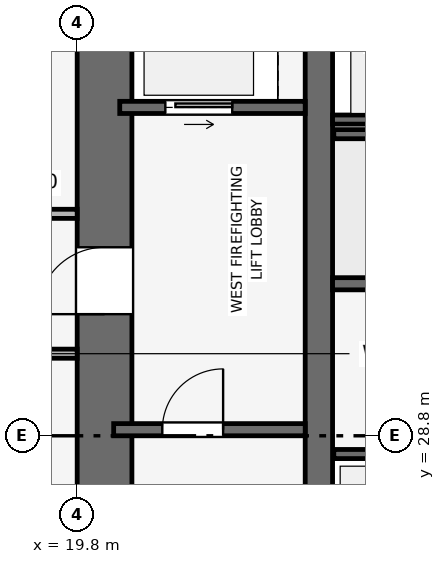
"""IFC4 building model, lengths in metres.
Left out: names, types, materials, properties, quantities, classifications, styles, units other than length and angle.
Written with IfcOpenShell. Run it as: python <this file> out.ifc"""

import sys

from ifc_helpers import new_model, si_unit, direction, frame, frame_2d, origin, place, context, subcontext, project, spatial, rectangle, extrude, element, fill, save


model = new_model("IFC4")
c1 = context("Model", 3, precision=1e-05, world=origin(), true_north=direction((0.0, 1.0)))
c2 = subcontext(c1, "Body", "Model", "MODEL_VIEW")
j1 = project(units=[si_unit("LENGTHUNIT", "METRE"), si_unit("PLANEANGLEUNIT", "RADIAN")], contexts=[c1])
p1 = place(None, origin())
s1 = spatial("IfcSite", under=j1, at=p1, CompositionType="ELEMENT")
p2 = place(p1, origin())
s2 = spatial("IfcBuilding", under=s1, at=p2, CompositionType="ELEMENT")
p3 = place(p2, frame((0.0, 0.0, 149.55)))
s3 = spatial("IfcBuildingStorey", under=s2, at=p3, CompositionType="ELEMENT", Elevation=149.55)
p4 = place(p3, frame((20.25, 20.7, 0.0), z_axis=(0.0, 0.0, 1.0), x_axis=(0.0, 1.0, 0.0)))
e1 = element("IfcWall", 1, at=p4, inside=s3, PredefinedType="SHEAR", context=c2, shape_type="SweptSolid", body=[
    extrude(rectangle(XDim=16.2, YDim=0.9, at=frame_2d((8.1, 0.0))), origin(), (0.0, 0.0, 1.0), 3.75),
])
p5 = place(p4, frame((10.1, 0.0, 0.0)))
e2 = element("IfcOpeningElement", 2, at=p5, cuts=e1, PredefinedType="OPENING", context=c2, shape_type="SweptSolid", body=[
    extrude(rectangle(XDim=1.1, YDim=2.15, at=frame_2d((0.55, 1.075))), frame((0.0, 0.46, 0.0), z_axis=(0.0, -1.0, 0.0), x_axis=(1.0, 0.0, 0.0)), (0.0, 0.0, 1.0), 0.92),
])
p6 = place(p3, frame((23.775, 20.7, 0.0), z_axis=(0.0, 0.0, 1.0), x_axis=(0.0, 1.0, 0.0)))
e3 = element("IfcWall", 3, at=p6, inside=s3, PredefinedType="SHEAR", context=c2, shape_type="SweptSolid", body=[
    extrude(rectangle(XDim=16.2, YDim=0.45, at=frame_2d((8.1, 0.0))), origin(), (0.0, 0.0, 1.0), 3.75),
])
p7 = place(p3, frame((20.4, 28.9, 0.0), z_axis=(0.0, 0.0, 1.0), x_axis=(1.0, 0.0, 0.0)))
e4 = element("IfcWall", 4, at=p7, inside=s3, PredefinedType="SHEAR", context=c2, shape_type="SweptSolid", body=[
    extrude(rectangle(XDim=3.15, YDim=0.2, at=frame_2d((1.575, 0.0))), origin(), (0.0, 0.0, 1.0), 3.495),
])
p8 = place(p7, frame((0.8, 0.0, 0.0)))
e5 = element("IfcOpeningElement", 5, at=p8, cuts=e4, PredefinedType="OPENING", context=c2, shape_type="SweptSolid", body=[
    extrude(rectangle(XDim=1.0, YDim=2.1, at=frame_2d((0.5, 1.05))), frame((0.0, 0.11, 0.0), z_axis=(0.0, -1.0, 0.0), x_axis=(1.0, 0.0, 0.0)), (0.0, 0.0, 1.0), 0.22),
])
p9 = place(p3, frame((20.5, 34.2, 0.0), z_axis=(0.0, 0.0, 1.0), x_axis=(1.0, 0.0, 0.0)))
e6 = element("IfcWall", 6, at=p9, inside=s3, PredefinedType="SHEAR", context=c2, shape_type="SweptSolid", body=[
    extrude(rectangle(XDim=3.05, YDim=0.2, at=frame_2d((1.525, 0.0))), origin(), (0.0, 0.0, 1.0), 3.495),
])
p10 = place(p9, frame((0.75, 0.0, 0.0)))
e7 = element("IfcOpeningElement", 7, at=p10, cuts=e6, PredefinedType="OPENING", context=c2, shape_type="SweptSolid", body=[
    extrude(rectangle(XDim=1.1, YDim=2.15, at=frame_2d((0.55, 1.075))), frame((0.0, 0.11, 0.0), z_axis=(0.0, -1.0, 0.0), x_axis=(1.0, 0.0, 0.0)), (0.0, 0.0, 1.0), 0.22),
])
p11 = place(p3, frame((24.0, 34.0, 0.0), z_axis=(0.0, 0.0, 1.0), x_axis=(1.0, 0.0, 0.0)))
e8 = element("IfcWall", 8, at=p11, inside=s3, PredefinedType="SHEAR", context=c2, shape_type="SweptSolid", body=[
    extrude(rectangle(XDim=2.48, YDim=0.15, at=frame_2d((1.24, 0.0))), origin(), (0.0, 0.0, 1.0), 3.495),
])
p12 = place(p3, frame((24.0, 31.3, 0.0), z_axis=(0.0, 0.0, 1.0), x_axis=(1.0, 0.0, 0.0)))
e9 = element("IfcWall", 9, at=p12, inside=s3, PredefinedType="SHEAR", context=c2, shape_type="SweptSolid", body=[
    extrude(rectangle(XDim=2.0, YDim=0.2, at=frame_2d((1.0, 0.0))), origin(), (0.0, 0.0, 1.0), 3.495),
])
for number, where, z_axis, x_axis in (
    (10, (24.02, 28.5, 0.0), (0.0, 0.0, 1.0), (1.0, 0.0, 0.0)),
    (11, (24.02, 33.76, 0.0), (0.0, 0.0, 1.0), (1.0, 0.0, 0.0)),
):
    element("IfcWall", number, at=place(p3, frame(where, z_axis=z_axis, x_axis=x_axis)), inside=s3, PredefinedType="SHEAR", context=c2, shape_type="SweptSolid", body=[
        extrude(rectangle(XDim=4.08, YDim=0.15, at=frame_2d((2.04, 0.0))), origin(), (0.0, 0.0, 1.0), 3.495),
    ])
for number, where, z_axis, x_axis in (
    (12, (15.4, 30.15, 0.0), (0.0, 0.0, 1.0), (1.0, 0.0, 0.0)),
    (13, (15.4, 32.45, 0.0), (0.0, 0.0, 1.0), (1.0, 0.0, 0.0)),
):
    element("IfcWall", number, at=place(p3, frame(where, z_axis=z_axis, x_axis=x_axis)), inside=s3, PredefinedType="PARTITIONING", context=c2, shape_type="SweptSolid", body=[
        extrude(rectangle(XDim=4.4, YDim=0.15, at=frame_2d((2.2, 0.0))), origin(), (0.0, 0.0, 1.0), 3.495),
    ])
p13 = place(p8, origin())
e14 = element("IfcDoor", 14, at=p13, inside=s3, OperationType="SINGLE_SWING_RIGHT", PredefinedType="DOOR", context=c2, shape_type="SweptSolid", body=[
    extrude(rectangle(XDim=1.0, YDim=2.1, at=frame_2d((0.5, 1.05))), frame((0.0, 0.025, 0.0), z_axis=(0.0, -1.0, 0.0), x_axis=(1.0, 0.0, 0.0)), (0.0, 0.0, 1.0), 0.05),
])
fill(e5, e14)
p14 = place(p10, origin())
e15 = element("IfcDoor", 15, at=p14, inside=s3, OperationType="SLIDING_TO_RIGHT", PredefinedType="DOOR", context=c2, shape_type="SweptSolid", body=[
    extrude(rectangle(XDim=1.1, YDim=2.15, at=frame_2d((0.55, 1.075))), frame((0.0, 0.025, 0.0), z_axis=(0.0, -1.0, 0.0), x_axis=(1.0, 0.0, 0.0)), (0.0, 0.0, 1.0), 0.05),
])
fill(e7, e15)
p15 = place(p5, origin())
e16 = element("IfcDoor", 16, at=p15, inside=s3, OperationType="SINGLE_SWING_LEFT", PredefinedType="DOOR", context=c2, shape_type="SweptSolid", body=[
    extrude(rectangle(XDim=1.1, YDim=2.15, at=frame_2d((0.55, 1.075))), frame((0.0, 0.025, 0.0), z_axis=(0.0, -1.0, 0.0), x_axis=(1.0, 0.0, 0.0)), (0.0, 0.0, 1.0), 0.05),
])
fill(e2, e16)
save(model, sys.argv[1])
